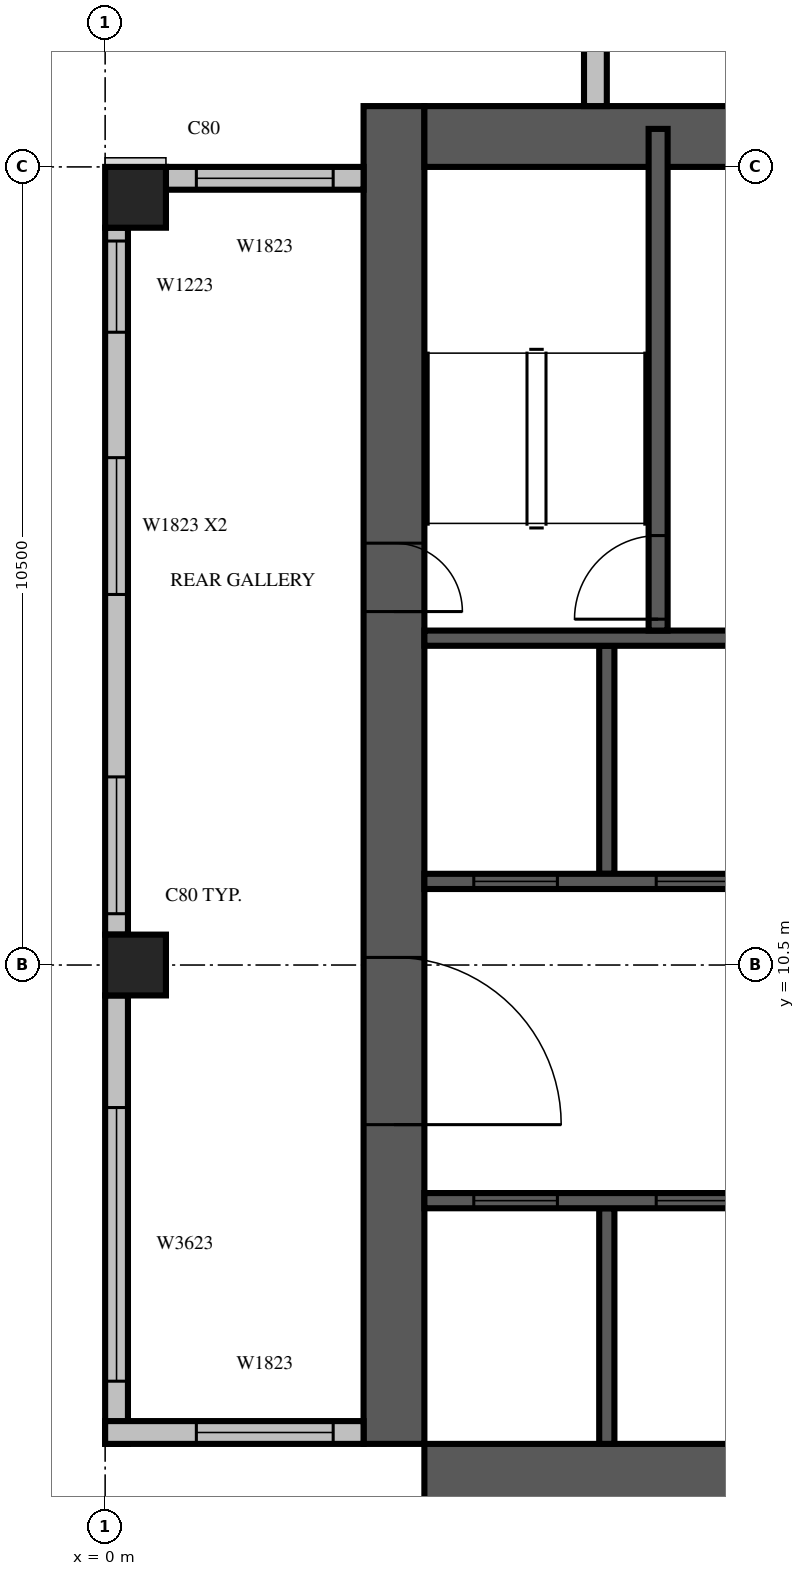
"""IFC4 building model, lengths in metres.
Left out: names, types, materials, properties, quantities, classifications, styles, units other than length and angle.
Written with IfcOpenShell. Run it as: python <this file> out.ifc"""

import sys

from ifc_helpers import new_model, si_unit, direction, frame, frame_2d, origin, origin_2d, place, context, subcontext, project, spatial, rectangle, extrude, source, transform, mapped, element, fill, save


model = new_model("IFC4")
c1 = context("Model", 3, precision=1e-05, world=origin(), true_north=direction((0.0, 1.0)))
c2 = subcontext(c1, "Body", "Model", "MODEL_VIEW")
j1 = project(units=[si_unit("LENGTHUNIT", "METRE"), si_unit("PLANEANGLEUNIT", "RADIAN")], contexts=[c1])
p1 = place(None, origin())
s1 = spatial("IfcSite", under=j1, at=p1, CompositionType="ELEMENT")
p2 = place(p1, origin())
s2 = spatial("IfcBuilding", under=s1, at=p2, CompositionType="ELEMENT")
p3 = place(p2, frame((0.0, 0.0, 265.2)))
s3 = spatial("IfcBuildingStorey", under=s2, at=p3, CompositionType="ELEMENT", Elevation=265.2)
m1 = source(origin(), c2, "Body", "SweptSolid", [
    extrude(rectangle(XDim=0.8, YDim=0.8, at=origin_2d()), origin(), (0.0, 0.0, 1.0), 3.8),
])
for number, where, z_axis, x_axis in (
    (1, (0.4, 10.5, 0.0), (0.0, 0.0, 1.0), (1.0, 0.0, 0.0)),
    (2, (0.4, 20.6, 0.0), (0.0, 0.0, 1.0), (1.0, 0.0, 0.0)),
):
    element("IfcColumn", number, at=place(p3, frame(where, z_axis=z_axis, x_axis=x_axis)), inside=s3, PredefinedType="COLUMN", context=c2, shape_type="MappedRepresentation", body=[
        mapped(m1, transform((0.0, 0.0, 0.0), scale=1.0)),
    ])
m2 = source(origin(), c2, "Body", "SweptSolid", [
    extrude(rectangle(XDim=17.6, YDim=0.8, at=frame_2d((8.8, 0.0))), origin(), (0.0, 0.0, 1.0), 3.8),
])
p4 = place(p3, frame((3.8, 4.2, 0.0), z_axis=(0.0, 0.0, 1.0), x_axis=(0.0, 1.0, 0.0)))
e3 = element("IfcWall", 3, at=p4, inside=s3, PredefinedType="SHEAR", context=c2, shape_type="MappedRepresentation", body=[
    mapped(m2, transform((0.0, 0.0, 0.0), scale=1.0)),
])
m3 = source(origin(), c2, "Body", "SweptSolid", [
    extrude(rectangle(XDim=2.2, YDim=2.1, at=frame_2d((1.1, 1.05))), frame((0.0, 0.41, 0.0), z_axis=(0.0, -1.0, 0.0), x_axis=(1.0, 0.0, 0.0)), (0.0, 0.0, 1.0), 0.82),
])
p5 = place(p4, frame((4.2, 0.0, 0.0)))
e4 = element("IfcOpeningElement", 4, at=p5, cuts=e3, PredefinedType="OPENING", context=c2, shape_type="MappedRepresentation", body=[
    mapped(m3, transform((0.0, 0.0, 0.0), scale=1.0)),
])
m4 = source(origin(), c2, "Body", "SweptSolid", [
    extrude(rectangle(XDim=0.9, YDim=2.1, at=frame_2d((0.45, 1.05))), frame((0.0, 0.41, 0.0), z_axis=(0.0, -1.0, 0.0), x_axis=(1.0, 0.0, 0.0)), (0.0, 0.0, 1.0), 0.82),
])
p6 = place(p4, frame((10.95, 0.0, 0.0)))
e5 = element("IfcOpeningElement", 5, at=p6, cuts=e3, PredefinedType="OPENING", context=c2, shape_type="MappedRepresentation", body=[
    mapped(m4, transform((0.0, 0.0, 0.0), scale=1.0)),
])
p7 = place(p3, frame((4.2, 3.8, 0.0), z_axis=(0.0, 0.0, 1.0), x_axis=(1.0, 0.0, 0.0)))
e6 = element("IfcWall", 6, at=p7, inside=s3, PredefinedType="SHEAR", context=c2, shape_type="MappedRepresentation", body=[
    mapped(m2, transform((0.0, 0.0, 0.0), scale=1.0)),
])
p8 = place(p7, frame((12.75, 0.0, 0.0)))
e7 = element("IfcOpeningElement", 7, at=p8, cuts=e6, PredefinedType="OPENING", context=c2, shape_type="MappedRepresentation", body=[
    mapped(m4, transform((0.0, 0.0, 0.0), scale=1.0)),
])
m5 = source(origin(), c2, "Body", "SweptSolid", [
    extrude(rectangle(XDim=16.8, YDim=0.8, at=frame_2d((8.4, 0.0))), origin(), (0.0, 0.0, 1.0), 3.8),
])
p9 = place(p3, frame((4.2, 21.4, 0.0), z_axis=(0.0, 0.0, 1.0), x_axis=(1.0, 0.0, 0.0)))
e8 = element("IfcWall", 8, at=p9, inside=s3, PredefinedType="SHEAR", context=c2, shape_type="MappedRepresentation", body=[
    mapped(m5, transform((0.0, 0.0, 0.0), scale=1.0)),
])
m6 = source(origin(), c2, "Body", "SweptSolid", [
    extrude(rectangle(XDim=1.2, YDim=2.1, at=frame_2d((0.6, 1.05))), frame((0.0, 0.41, 0.0), z_axis=(0.0, -1.0, 0.0), x_axis=(1.0, 0.0, 0.0)), (0.0, 0.0, 1.0), 0.82),
])
p10 = place(p9, frame((6.2, 0.0, 0.0)))
e9 = element("IfcOpeningElement", 9, at=p10, cuts=e8, PredefinedType="OPENING", context=c2, shape_type="MappedRepresentation", body=[
    mapped(m6, transform((0.0, 0.0, 0.0), scale=1.0)),
])
m7 = source(origin(), c2, "Body", "SweptSolid", [
    extrude(rectangle(XDim=16.6, YDim=0.3, at=frame_2d((8.3, 0.0))), origin(), (0.0, 0.0, 1.0), 3.4),
])
p11 = place(p3, frame((6.45, 38.4, 0.0), z_axis=(0.0, 0.0, 1.0), x_axis=(0.0, -1.0, 0.0)))
e10 = element("IfcWall", 10, at=p11, inside=s3, PredefinedType="STANDARD", context=c2, shape_type="MappedRepresentation", body=[
    mapped(m7, transform((0.0, 0.0, 0.0), scale=1.0)),
])
m8 = source(origin(), c2, "Body", "SweptSolid", [
    extrude(rectangle(XDim=1.8, YDim=2.3, at=frame_2d((0.9, 1.15))), frame((0.0, 0.16, 0.0), z_axis=(0.0, -1.0, 0.0), x_axis=(1.0, 0.0, 0.0)), (0.0, 0.0, 1.0), 0.32),
])
p12 = place(p11, frame((1.15, 0.0, 0.6)))
e11 = element("IfcOpeningElement", 11, at=p12, cuts=e10, PredefinedType="OPENING", context=c2, shape_type="MappedRepresentation", body=[
    mapped(m8, transform((0.0, 0.0, 0.0), scale=1.0)),
])
m9 = source(origin(), c2, "Body", "SweptSolid", [
    extrude(rectangle(XDim=2.4, YDim=2.3, at=frame_2d((1.2, 1.15))), frame((0.0, 0.16, 0.0), z_axis=(0.0, -1.0, 0.0), x_axis=(1.0, 0.0, 0.0)), (0.0, 0.0, 1.0), 0.32),
])
p13 = place(p11, frame((4.75, 0.0, 0.6)))
e12 = element("IfcOpeningElement", 12, at=p13, cuts=e10, PredefinedType="OPENING", context=c2, shape_type="MappedRepresentation", body=[
    mapped(m9, transform((0.0, 0.0, 0.0), scale=1.0)),
])
p14 = place(p11, frame((9.438, 0.0, 0.6)))
e13 = element("IfcOpeningElement", 13, at=p14, cuts=e10, PredefinedType="OPENING", context=c2, shape_type="MappedRepresentation", body=[
    mapped(m8, transform((0.0, 0.0, 0.0), scale=1.0)),
])
m10 = source(origin(), c2, "Body", "SweptSolid", [
    extrude(rectangle(XDim=3.0, YDim=2.3, at=frame_2d((1.5, 1.15))), frame((0.0, 0.16, 0.0), z_axis=(0.0, -1.0, 0.0), x_axis=(1.0, 0.0, 0.0)), (0.0, 0.0, 1.0), 0.32),
])
p15 = place(p11, frame((12.7, 0.0, 0.6)))
e14 = element("IfcOpeningElement", 14, at=p15, cuts=e10, PredefinedType="OPENING", context=c2, shape_type="MappedRepresentation", body=[
    mapped(m10, transform((0.0, 0.0, 0.0), scale=1.0)),
])
m11 = source(origin(), c2, "Body", "SweptSolid", [
    extrude(rectangle(XDim=2.6, YDim=0.3, at=frame_2d((1.3, 0.0))), origin(), (0.0, 0.0, 1.0), 3.4),
])
p16 = place(p3, frame((3.4, 20.85, 0.0), z_axis=(0.0, 0.0, 1.0), x_axis=(-1.0, 0.0, 0.0)))
e15 = element("IfcWall", 15, at=p16, inside=s3, PredefinedType="STANDARD", context=c2, shape_type="MappedRepresentation", body=[
    mapped(m11, transform((0.0, 0.0, 0.0), scale=1.0)),
])
p17 = place(p16, frame((0.4, 0.0, 0.6)))
e16 = element("IfcOpeningElement", 16, at=p17, cuts=e15, PredefinedType="OPENING", context=c2, shape_type="MappedRepresentation", body=[
    mapped(m8, transform((0.0, 0.0, 0.0), scale=1.0)),
])
m12 = source(origin(), c2, "Body", "SweptSolid", [
    extrude(rectangle(XDim=9.3, YDim=0.3, at=frame_2d((4.65, 0.0))), origin(), (0.0, 0.0, 1.0), 3.4),
])
p18 = place(p3, frame((0.15, 20.2, 0.0), z_axis=(0.0, 0.0, 1.0), x_axis=(0.0, -1.0, 0.0)))
e17 = element("IfcWall", 17, at=p18, inside=s3, PredefinedType="STANDARD", context=c2, shape_type="MappedRepresentation", body=[
    mapped(m12, transform((0.0, 0.0, 0.0), scale=1.0)),
])
m13 = source(origin(), c2, "Body", "SweptSolid", [
    extrude(rectangle(XDim=1.2, YDim=2.3, at=frame_2d((0.6, 1.15))), frame((0.0, 0.16, 0.0), z_axis=(0.0, -1.0, 0.0), x_axis=(1.0, 0.0, 0.0)), (0.0, 0.0, 1.0), 0.32),
])
p19 = place(p18, frame((0.175, 0.0, 0.6)))
e18 = element("IfcOpeningElement", 18, at=p19, cuts=e17, PredefinedType="OPENING", context=c2, shape_type="MappedRepresentation", body=[
    mapped(m13, transform((0.0, 0.0, 0.0), scale=1.0)),
])
p20 = place(p18, frame((3.025, 0.0, 0.6)))
e19 = element("IfcOpeningElement", 19, at=p20, cuts=e17, PredefinedType="OPENING", context=c2, shape_type="MappedRepresentation", body=[
    mapped(m8, transform((0.0, 0.0, 0.0), scale=1.0)),
])
p21 = place(p18, frame((7.225, 0.0, 0.6)))
e20 = element("IfcOpeningElement", 20, at=p21, cuts=e17, PredefinedType="OPENING", context=c2, shape_type="MappedRepresentation", body=[
    mapped(m8, transform((0.0, 0.0, 0.0), scale=1.0)),
])
m14 = source(origin(), c2, "Body", "SweptSolid", [
    extrude(rectangle(XDim=5.9, YDim=0.3, at=frame_2d((2.95, 0.0))), origin(), (0.0, 0.0, 1.0), 3.4),
])
p22 = place(p3, frame((0.15, 10.1, 0.0), z_axis=(0.0, 0.0, 1.0), x_axis=(0.0, -1.0, 0.0)))
e21 = element("IfcWall", 21, at=p22, inside=s3, PredefinedType="STANDARD", context=c2, shape_type="MappedRepresentation", body=[
    mapped(m14, transform((0.0, 0.0, 0.0), scale=1.0)),
])
m15 = source(origin(), c2, "Body", "SweptSolid", [
    extrude(rectangle(XDim=3.6, YDim=2.3, at=frame_2d((1.8, 1.15))), frame((0.0, 0.16, 0.0), z_axis=(0.0, -1.0, 0.0), x_axis=(1.0, 0.0, 0.0)), (0.0, 0.0, 1.0), 0.32),
])
p23 = place(p22, frame((1.475, 0.0, 0.6)))
e22 = element("IfcOpeningElement", 22, at=p23, cuts=e21, PredefinedType="OPENING", context=c2, shape_type="MappedRepresentation", body=[
    mapped(m15, transform((0.0, 0.0, 0.0), scale=1.0)),
])
m16 = source(origin(), c2, "Body", "SweptSolid", [
    extrude(rectangle(XDim=3.4, YDim=0.3, at=frame_2d((1.7, 0.0))), origin(), (0.0, 0.0, 1.0), 3.4),
])
p24 = place(p3, frame((0.0, 4.35, 0.0), z_axis=(0.0, 0.0, 1.0), x_axis=(1.0, 0.0, 0.0)))
e23 = element("IfcWall", 23, at=p24, inside=s3, PredefinedType="STANDARD", context=c2, shape_type="MappedRepresentation", body=[
    mapped(m16, transform((0.0, 0.0, 0.0), scale=1.0)),
])
p25 = place(p24, frame((1.2, 0.0, 0.6)))
e24 = element("IfcOpeningElement", 24, at=p25, cuts=e23, PredefinedType="OPENING", context=c2, shape_type="MappedRepresentation", body=[
    mapped(m8, transform((0.0, 0.0, 0.0), scale=1.0)),
])
m17 = source(origin(), c2, "Body", "SweptSolid", [
    extrude(rectangle(XDim=3.1, YDim=0.2, at=frame_2d((1.55, 0.0))), origin(), (0.0, 0.0, 1.0), 3.8),
])
p26 = place(p3, frame((6.6, 4.2, 0.0), z_axis=(0.0, 0.0, 1.0), x_axis=(0.0, 1.0, 0.0)))
e25 = element("IfcWall", 25, at=p26, inside=s3, PredefinedType="SOLIDWALL", context=c2, shape_type="MappedRepresentation", body=[
    mapped(m17, transform((0.0, 0.0, 0.0), scale=1.0)),
])
m18 = source(origin(), c2, "Body", "SweptSolid", [
    extrude(rectangle(XDim=3.0, YDim=0.2, at=frame_2d((1.5, 0.0))), origin(), (0.0, 0.0, 1.0), 3.8),
])
p27 = place(p3, frame((6.6, 11.7, 0.0), z_axis=(0.0, 0.0, 1.0), x_axis=(0.0, 1.0, 0.0)))
e26 = element("IfcWall", 26, at=p27, inside=s3, PredefinedType="SOLIDWALL", context=c2, shape_type="MappedRepresentation", body=[
    mapped(m18, transform((0.0, 0.0, 0.0), scale=1.0)),
])
m19 = source(origin(), c2, "Body", "SweptSolid", [
    extrude(rectangle(XDim=9.6, YDim=0.2, at=frame_2d((4.8, 0.0))), origin(), (0.0, 0.0, 1.0), 3.8),
])
p28 = place(p3, frame((4.2, 7.4, 0.0), z_axis=(0.0, 0.0, 1.0), x_axis=(1.0, 0.0, 0.0)))
e27 = element("IfcWall", 27, at=p28, inside=s3, PredefinedType="SOLIDWALL", context=c2, shape_type="MappedRepresentation", body=[
    mapped(m19, transform((0.0, 0.0, 0.0), scale=1.0)),
])
m20 = source(origin(), c2, "Body", "SweptSolid", [
    extrude(rectangle(XDim=1.1, YDim=2.1, at=frame_2d((0.55, 1.05))), frame((0.0, 0.11, 0.0), z_axis=(0.0, -1.0, 0.0), x_axis=(1.0, 0.0, 0.0)), (0.0, 0.0, 1.0), 0.22),
])
p29 = place(p28, frame((0.65, 0.0, 0.0)))
e28 = element("IfcOpeningElement", 28, at=p29, cuts=e27, PredefinedType="OPENING", context=c2, shape_type="MappedRepresentation", body=[
    mapped(m20, transform((0.0, 0.0, 0.0), scale=1.0)),
])
p30 = place(p28, frame((3.05, 0.0, 0.0)))
e29 = element("IfcOpeningElement", 29, at=p30, cuts=e27, PredefinedType="OPENING", context=c2, shape_type="MappedRepresentation", body=[
    mapped(m20, transform((0.0, 0.0, 0.0), scale=1.0)),
])
p31 = place(p28, frame((5.45, 0.0, 0.0)))
e30 = element("IfcOpeningElement", 30, at=p31, cuts=e27, PredefinedType="OPENING", context=c2, shape_type="MappedRepresentation", body=[
    mapped(m20, transform((0.0, 0.0, 0.0), scale=1.0)),
])
p32 = place(p28, frame((7.85, 0.0, 0.0)))
e31 = element("IfcOpeningElement", 31, at=p32, cuts=e27, PredefinedType="OPENING", context=c2, shape_type="MappedRepresentation", body=[
    mapped(m20, transform((0.0, 0.0, 0.0), scale=1.0)),
])
m21 = source(origin(), c2, "Body", "SweptSolid", [
    extrude(rectangle(XDim=4.8, YDim=0.2, at=frame_2d((2.4, 0.0))), origin(), (0.0, 0.0, 1.0), 3.8),
])
p33 = place(p3, frame((4.2, 11.6, 0.0), z_axis=(0.0, 0.0, 1.0), x_axis=(1.0, 0.0, 0.0)))
e32 = element("IfcWall", 32, at=p33, inside=s3, PredefinedType="SOLIDWALL", context=c2, shape_type="MappedRepresentation", body=[
    mapped(m21, transform((0.0, 0.0, 0.0), scale=1.0)),
])
p34 = place(p33, frame((0.65, 0.0, 0.0)))
e33 = element("IfcOpeningElement", 33, at=p34, cuts=e32, PredefinedType="OPENING", context=c2, shape_type="MappedRepresentation", body=[
    mapped(m20, transform((0.0, 0.0, 0.0), scale=1.0)),
])
p35 = place(p33, frame((3.05, 0.0, 0.0)))
e34 = element("IfcOpeningElement", 34, at=p35, cuts=e32, PredefinedType="OPENING", context=c2, shape_type="MappedRepresentation", body=[
    mapped(m20, transform((0.0, 0.0, 0.0), scale=1.0)),
])
p36 = place(p3, frame((4.2, 14.8, 0.0), z_axis=(0.0, 0.0, 1.0), x_axis=(1.0, 0.0, 0.0)))
e35 = element("IfcWall", 35, at=p36, inside=s3, PredefinedType="SOLIDWALL", context=c2, shape_type="MappedRepresentation", body=[
    mapped(m21, transform((0.0, 0.0, 0.0), scale=1.0)),
])
m22 = source(origin(), c2, "Body", "SweptSolid", [
    extrude(rectangle(XDim=6.6, YDim=0.25, at=frame_2d((3.3, 0.0))), origin(), (0.0, 0.0, 1.0), 3.4),
])
p37 = place(p3, frame((7.275, 14.9, 0.0), z_axis=(0.0, 0.0, 1.0), x_axis=(0.0, 1.0, 0.0)))
e36 = element("IfcWall", 36, at=p37, inside=s3, PredefinedType="SOLIDWALL", context=c2, shape_type="MappedRepresentation", body=[
    mapped(m22, transform((0.0, 0.0, 0.0), scale=1.0)),
])
m23 = source(origin(), c2, "Body", "SweptSolid", [
    extrude(rectangle(XDim=1.1, YDim=2.1, at=frame_2d((0.55, 1.05))), frame((0.0, 0.135, 0.0), z_axis=(0.0, -1.0, 0.0), x_axis=(1.0, 0.0, 0.0)), (0.0, 0.0, 1.0), 0.27),
])
p38 = place(p37, frame((0.15, 0.0, 0.0)))
e37 = element("IfcOpeningElement", 37, at=p38, cuts=e36, PredefinedType="OPENING", context=c2, shape_type="MappedRepresentation", body=[
    mapped(m23, transform((0.0, 0.0, 0.0), scale=1.0)),
])
m24 = source(origin(), c2, "Body", "SweptSolid", [
    extrude(rectangle(XDim=1.8, YDim=2.3, at=frame_2d((0.9, 1.15))), frame((0.0, 0.03, 0.0), z_axis=(0.0, -1.0, 0.0), x_axis=(1.0, 0.0, 0.0)), (0.0, 0.0, 1.0), 0.06),
])
p39 = place(p17, origin())
e38 = element("IfcWindow", 38, at=p39, inside=s3, PartitioningType="SINGLE_PANEL", PredefinedType="WINDOW", context=c2, shape_type="MappedRepresentation", body=[
    mapped(m24, transform((0.0, 0.0, 0.0), scale=1.0)),
])
fill(e16, e38)
m25 = source(origin(), c2, "Body", "SweptSolid", [
    extrude(rectangle(XDim=1.2, YDim=2.3, at=frame_2d((0.6, 1.15))), frame((0.0, 0.03, 0.0), z_axis=(0.0, -1.0, 0.0), x_axis=(1.0, 0.0, 0.0)), (0.0, 0.0, 1.0), 0.06),
])
p40 = place(p19, origin())
e39 = element("IfcWindow", 39, at=p40, inside=s3, PartitioningType="SINGLE_PANEL", PredefinedType="WINDOW", context=c2, shape_type="MappedRepresentation", body=[
    mapped(m25, transform((0.0, 0.0, 0.0), scale=1.0)),
])
fill(e18, e39)
p41 = place(p20, origin())
e40 = element("IfcWindow", 40, at=p41, inside=s3, PartitioningType="SINGLE_PANEL", PredefinedType="WINDOW", context=c2, shape_type="MappedRepresentation", body=[
    mapped(m24, transform((0.0, 0.0, 0.0), scale=1.0)),
])
fill(e19, e40)
p42 = place(p21, origin())
e41 = element("IfcWindow", 41, at=p42, inside=s3, PartitioningType="SINGLE_PANEL", PredefinedType="WINDOW", context=c2, shape_type="MappedRepresentation", body=[
    mapped(m24, transform((0.0, 0.0, 0.0), scale=1.0)),
])
fill(e20, e41)
m26 = source(origin(), c2, "Body", "SweptSolid", [
    extrude(rectangle(XDim=3.6, YDim=2.3, at=frame_2d((1.8, 1.15))), frame((0.0, 0.03, 0.0), z_axis=(0.0, -1.0, 0.0), x_axis=(1.0, 0.0, 0.0)), (0.0, 0.0, 1.0), 0.06),
])
p43 = place(p23, origin())
e42 = element("IfcWindow", 42, at=p43, inside=s3, PartitioningType="SINGLE_PANEL", PredefinedType="WINDOW", context=c2, shape_type="MappedRepresentation", body=[
    mapped(m26, transform((0.0, 0.0, 0.0), scale=1.0)),
])
fill(e22, e42)
p44 = place(p25, origin())
e43 = element("IfcWindow", 43, at=p44, inside=s3, PartitioningType="SINGLE_PANEL", PredefinedType="WINDOW", context=c2, shape_type="MappedRepresentation", body=[
    mapped(m24, transform((0.0, 0.0, 0.0), scale=1.0)),
])
fill(e24, e43)
m27 = source(origin(), c2, "Body", "SweptSolid", [
    extrude(rectangle(XDim=1.1, YDim=2.1, at=frame_2d((0.55, 1.05))), frame((0.0, 0.025, 0.0), z_axis=(0.0, -1.0, 0.0), x_axis=(1.0, 0.0, 0.0)), (0.0, 0.0, 1.0), 0.05),
])
p45 = place(p29, origin())
e44 = element("IfcDoor", 44, at=p45, inside=s3, OperationType="SLIDING_TO_LEFT", PredefinedType="DOOR", context=c2, shape_type="MappedRepresentation", body=[
    mapped(m27, transform((0.0, 0.0, 0.0), scale=1.0)),
])
fill(e28, e44)
p46 = place(p30, origin())
e45 = element("IfcDoor", 45, at=p46, inside=s3, OperationType="SLIDING_TO_LEFT", PredefinedType="DOOR", context=c2, shape_type="MappedRepresentation", body=[
    mapped(m27, transform((0.0, 0.0, 0.0), scale=1.0)),
])
fill(e29, e45)
p47 = place(p34, origin())
e46 = element("IfcDoor", 46, at=p47, inside=s3, OperationType="SLIDING_TO_LEFT", PredefinedType="DOOR", context=c2, shape_type="MappedRepresentation", body=[
    mapped(m27, transform((0.0, 0.0, 0.0), scale=1.0)),
])
fill(e33, e46)
p48 = place(p35, origin())
e47 = element("IfcDoor", 47, at=p48, inside=s3, OperationType="SLIDING_TO_LEFT", PredefinedType="DOOR", context=c2, shape_type="MappedRepresentation", body=[
    mapped(m27, transform((0.0, 0.0, 0.0), scale=1.0)),
])
fill(e34, e47)
p49 = place(p38, origin())
e48 = element("IfcDoor", 48, at=p49, inside=s3, OperationType="SINGLE_SWING_LEFT", PredefinedType="DOOR", context=c2, shape_type="MappedRepresentation", body=[
    mapped(m27, transform((0.0, 0.0, 0.0), scale=1.0)),
])
fill(e37, e48)
m28 = source(origin(), c2, "Body", "SweptSolid", [
    extrude(rectangle(XDim=2.2, YDim=2.1, at=frame_2d((1.1, 1.05))), frame((0.0, 0.025, 0.0), z_axis=(0.0, -1.0, 0.0), x_axis=(1.0, 0.0, 0.0)), (0.0, 0.0, 1.0), 0.05),
])
p50 = place(p5, origin())
e49 = element("IfcDoor", 49, at=p50, inside=s3, OperationType="DOUBLE_DOOR_SINGLE_SWING", PredefinedType="DOOR", context=c2, shape_type="MappedRepresentation", body=[
    mapped(m28, transform((0.0, 0.0, 0.0), scale=1.0)),
])
fill(e4, e49)
m29 = source(origin(), c2, "Body", "SweptSolid", [
    extrude(rectangle(XDim=0.9, YDim=2.1, at=frame_2d((0.45, 1.05))), frame((0.0, 0.025, 0.0), z_axis=(0.0, -1.0, 0.0), x_axis=(1.0, 0.0, 0.0)), (0.0, 0.0, 1.0), 0.05),
])
p51 = place(p6, origin())
e50 = element("IfcDoor", 50, at=p51, inside=s3, OperationType="SINGLE_SWING_RIGHT", PredefinedType="DOOR", context=c2, shape_type="MappedRepresentation", body=[
    mapped(m29, transform((0.0, 0.0, 0.0), scale=1.0)),
])
fill(e5, e50)
save(model, sys.argv[1])
